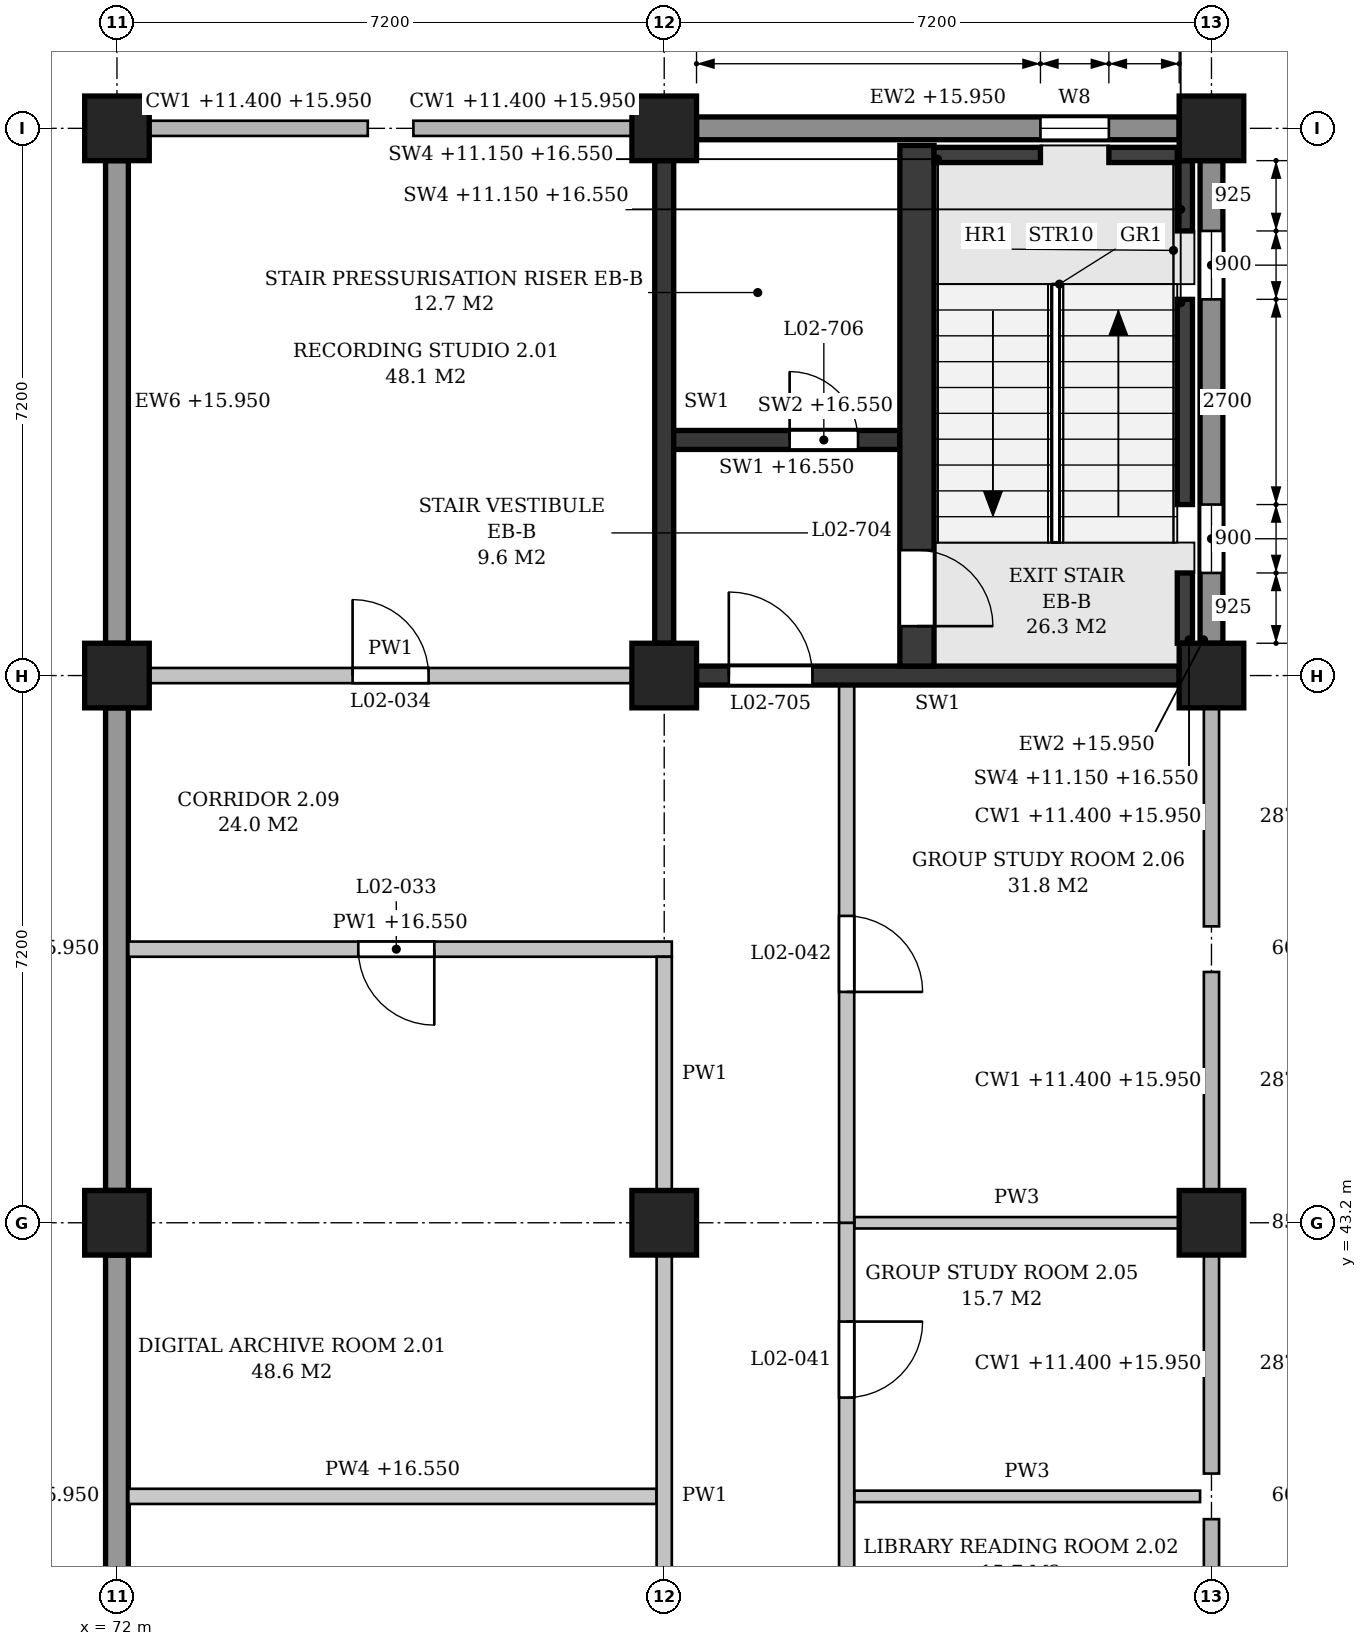
"""IFC4 building model, lengths in metres.
Left out: names, types, materials, properties, quantities, classifications, styles, units other than length and angle.
Written with IfcOpenShell. Run it as: python <this file> out.ifc"""

import sys

from ifc_helpers import new_model, si_unit, direction, frame, frame_2d, origin, origin_2d, place, context, subcontext, project, spatial, polyline, rectangle, outline, extrude, element, fill, save


model = new_model("IFC4")
c1 = context("Model", 3, precision=1e-05, world=origin(), true_north=direction((0.0, 1.0)))
c2 = subcontext(c1, "Body", "Model", "MODEL_VIEW")
j1 = project(units=[si_unit("LENGTHUNIT", "METRE"), si_unit("PLANEANGLEUNIT", "RADIAN")], contexts=[c1])
p1 = place(None, origin())
s1 = spatial("IfcSite", under=j1, at=p1, CompositionType="ELEMENT")
p2 = place(p1, origin())
s2 = spatial("IfcBuilding", under=s1, at=p2, CompositionType="ELEMENT")
p3 = place(p2, frame((0.0, 0.0, 11.4)))
s3 = spatial("IfcBuildingStorey", under=s2, at=p3, CompositionType="ELEMENT", Elevation=11.4)
for number, where, z_axis, x_axis in (
    (1, (72.0, 43.2, 0.0), (0.0, 0.0, 1.0), (1.0, 0.0, 0.0)),
    (2, (72.0, 50.4, 0.0), (0.0, 0.0, 1.0), (1.0, 0.0, 0.0)),
    (3, (72.0, 57.6, 0.0), (0.0, 0.0, 1.0), (1.0, 0.0, 0.0)),
    (4, (79.2, 43.2, 0.0), (0.0, 0.0, 1.0), (1.0, 0.0, 0.0)),
    (5, (79.2, 50.4, 0.0), (0.0, 0.0, 1.0), (1.0, 0.0, 0.0)),
    (6, (79.2, 57.6, 0.0), (0.0, 0.0, 1.0), (1.0, 0.0, 0.0)),
    (7, (86.4, 43.2, 0.0), (0.0, 0.0, 1.0), (1.0, 0.0, 0.0)),
    (8, (86.4, 50.4, 0.0), (0.0, 0.0, 1.0), (1.0, 0.0, 0.0)),
    (9, (86.4, 57.6, 0.0), (0.0, 0.0, 1.0), (1.0, 0.0, 0.0)),
):
    element("IfcColumn", number, at=place(p3, frame(where, z_axis=z_axis, x_axis=x_axis)), inside=s3, PredefinedType="COLUMN", context=c2, shape_type="SweptSolid", body=[
        extrude(rectangle(XDim=0.85, YDim=0.85, at=origin_2d()), origin(), (0.0, 0.0, 1.0), 5.4),
    ])
p4 = place(p3, frame((86.4, 50.825, 0.0), z_axis=(0.0, 0.0, 1.0), x_axis=(0.0, 1.0, 0.0)))
e10 = element("IfcWall", 10, at=p4, inside=s3, PredefinedType="STANDARD", context=c2, shape_type="SweptSolid", body=[
    extrude(rectangle(XDim=6.35, YDim=0.3, at=frame_2d((3.175, 0.0))), origin(), (0.0, 0.0, 1.0), 4.55),
])
p5 = place(p4, frame((0.925, 0.0, 0.9)))
e11 = element("IfcOpeningElement", 11, at=p5, cuts=e10, PredefinedType="OPENING", context=c2, shape_type="SweptSolid", body=[
    extrude(outline(polyline([(0.0, 0.0), (0.9, 0.0), (0.9, 2.65), (0.45, 3.1), (0.0, 2.65), (0.0, 0.0)])), frame((0.0, 0.16, 0.0), z_axis=(0.0, -1.0, 0.0), x_axis=(1.0, 0.0, 0.0)), (0.0, 0.0, 1.0), 0.32),
])
p6 = place(p4, frame((4.525, 0.0, 0.9)))
e12 = element("IfcOpeningElement", 12, at=p6, cuts=e10, PredefinedType="OPENING", context=c2, shape_type="SweptSolid", body=[
    extrude(outline(polyline([(0.0, 0.0), (0.9, 0.0), (0.9, 2.65), (0.45, 3.1), (0.0, 2.65), (0.0, 0.0)])), frame((0.0, 0.16, 0.0), z_axis=(0.0, -1.0, 0.0), x_axis=(1.0, 0.0, 0.0)), (0.0, 0.0, 1.0), 0.32),
])
p7 = place(p3, frame((85.975, 57.6, 0.0), z_axis=(0.0, 0.0, 1.0), x_axis=(-1.0, 0.0, 0.0)))
e13 = element("IfcWall", 13, at=p7, inside=s3, PredefinedType="STANDARD", context=c2, shape_type="SweptSolid", body=[
    extrude(rectangle(XDim=6.35, YDim=0.3, at=frame_2d((3.175, 0.0))), origin(), (0.0, 0.0, 1.0), 4.55),
])
p8 = place(p7, frame((0.925, 0.0, 0.9)))
e14 = element("IfcOpeningElement", 14, at=p8, cuts=e13, PredefinedType="OPENING", context=c2, shape_type="SweptSolid", body=[
    extrude(outline(polyline([(0.0, 0.0), (0.9, 0.0), (0.9, 2.65), (0.45, 3.1), (0.0, 2.65), (0.0, 0.0)])), frame((0.0, 0.16, 0.0), z_axis=(0.0, -1.0, 0.0), x_axis=(1.0, 0.0, 0.0)), (0.0, 0.0, 1.0), 0.32),
])
p9 = place(p3, frame((72.0, 36.425, 0.0), z_axis=(0.0, 0.0, 1.0), x_axis=(0.0, 1.0, 0.0)))
e15 = element("IfcWall", 15, at=p9, inside=s3, PredefinedType="STANDARD", context=c2, shape_type="SweptSolid", body=[
    extrude(rectangle(XDim=6.35, YDim=0.3, at=frame_2d((3.175, 0.0))), origin(), (0.0, 0.0, 1.0), 4.55),
])
for number, where, z_axis, x_axis in (
    (16, (72.0, 43.625, 0.0), (0.0, 0.0, 1.0), (0.0, 1.0, 0.0)),
    (17, (72.0, 50.825, 0.0), (0.0, 0.0, 1.0), (0.0, 1.0, 0.0)),
):
    element("IfcWall", number, at=place(p3, frame(where, z_axis=z_axis, x_axis=x_axis)), inside=s3, PredefinedType="STANDARD", context=c2, shape_type="SweptSolid", body=[
        extrude(rectangle(XDim=6.35, YDim=0.3, at=frame_2d((3.175, 0.0))), origin(), (0.0, 0.0, 1.0), 4.55),
    ])
p10 = place(p3, frame((79.625, 50.4, 0.0), z_axis=(0.0, 0.0, 1.0), x_axis=(1.0, 0.0, 0.0)))
e18 = element("IfcWall", 18, at=p10, inside=s3, PredefinedType="SHEAR", context=c2, shape_type="SweptSolid", body=[
    extrude(rectangle(XDim=6.35, YDim=0.25, at=frame_2d((3.175, 0.0))), origin(), (0.0, 0.0, 1.0), 4.4),
])
p11 = place(p10, frame((0.425, 0.0, 0.0)))
e19 = element("IfcOpeningElement", 19, at=p11, cuts=e18, PredefinedType="OPENING", context=c2, shape_type="SweptSolid", body=[
    extrude(rectangle(XDim=1.1, YDim=2.1, at=frame_2d((0.55, 1.05))), frame((0.0, 0.135, 0.0), z_axis=(0.0, -1.0, 0.0), x_axis=(1.0, 0.0, 0.0)), (0.0, 0.0, 1.0), 0.27),
])
p12 = place(p3, frame((79.2, 50.825, 0.0), z_axis=(0.0, 0.0, 1.0), x_axis=(0.0, 1.0, 0.0)))
e20 = element("IfcWall", 20, at=p12, inside=s3, PredefinedType="SHEAR", context=c2, shape_type="SweptSolid", body=[
    extrude(rectangle(XDim=6.35, YDim=0.25, at=frame_2d((3.175, 0.0))), origin(), (0.0, 0.0, 1.0), 4.4),
])
p13 = place(p3, frame((86.05, 50.825, -0.25), z_axis=(0.0, 0.0, 1.0), x_axis=(0.0, 1.0, 0.0)))
e21 = element("IfcWall", 21, at=p13, inside=s3, PredefinedType="SHEAR", context=c2, shape_type="SweptSolid", body=[
    extrude(rectangle(XDim=0.925, YDim=0.2, at=frame_2d((0.462, 0.0))), origin(), (0.0, 0.0, 1.0), 5.4),
])
p14 = place(p3, frame((86.05, 52.65, -0.25), z_axis=(0.0, 0.0, 1.0), x_axis=(0.0, 1.0, 0.0)))
e22 = element("IfcWall", 22, at=p14, inside=s3, PredefinedType="SHEAR", context=c2, shape_type="SweptSolid", body=[
    extrude(rectangle(XDim=2.7, YDim=0.2, at=frame_2d((1.35, 0.0))), origin(), (0.0, 0.0, 1.0), 5.4),
])
p15 = place(p3, frame((86.05, 56.25, -0.25), z_axis=(0.0, 0.0, 1.0), x_axis=(0.0, 1.0, 0.0)))
e23 = element("IfcWall", 23, at=p15, inside=s3, PredefinedType="SHEAR", context=c2, shape_type="SweptSolid", body=[
    extrude(rectangle(XDim=0.925, YDim=0.2, at=frame_2d((0.462, 0.0))), origin(), (0.0, 0.0, 1.0), 5.4),
])
p16 = place(p3, frame((82.75, 57.25, -0.25), z_axis=(0.0, 0.0, 1.0), x_axis=(1.0, 0.0, 0.0)))
e24 = element("IfcWall", 24, at=p16, inside=s3, PredefinedType="SHEAR", context=c2, shape_type="SweptSolid", body=[
    extrude(rectangle(XDim=1.4, YDim=0.2, at=frame_2d((0.7, 0.0))), origin(), (0.0, 0.0, 1.0), 5.4),
])
p17 = place(p3, frame((85.05, 57.25, -0.25), z_axis=(0.0, 0.0, 1.0), x_axis=(1.0, 0.0, 0.0)))
e25 = element("IfcWall", 25, at=p17, inside=s3, PredefinedType="SHEAR", context=c2, shape_type="SweptSolid", body=[
    extrude(rectangle(XDim=0.9, YDim=0.2, at=frame_2d((0.45, 0.0))), origin(), (0.0, 0.0, 1.0), 5.4),
])
p18 = place(p3, frame((82.525, 50.525, 0.0), z_axis=(0.0, 0.0, 1.0), x_axis=(0.0, 1.0, 0.0)))
e26 = element("IfcWall", 26, at=p18, inside=s3, PredefinedType="SHEAR", context=c2, shape_type="SweptSolid", body=[
    extrude(rectangle(XDim=6.85, YDim=0.45, at=frame_2d((3.425, 0.0))), origin(), (0.0, 0.0, 1.0), 5.15),
])
p19 = place(p18, frame((0.525, 0.0, 0.0)))
e27 = element("IfcOpeningElement", 27, at=p19, cuts=e26, PredefinedType="OPENING", context=c2, shape_type="SweptSolid", body=[
    extrude(rectangle(XDim=1.0, YDim=2.1, at=frame_2d((0.5, 1.05))), frame((0.0, 0.235, 0.0), z_axis=(0.0, -1.0, 0.0), x_axis=(1.0, 0.0, 0.0)), (0.0, 0.0, 1.0), 0.47),
])
p20 = place(p3, frame((79.325, 53.5, 0.0), z_axis=(0.0, 0.0, 1.0), x_axis=(1.0, 0.0, 0.0)))
e28 = element("IfcWall", 28, at=p20, inside=s3, PredefinedType="SHEAR", context=c2, shape_type="SweptSolid", body=[
    extrude(rectangle(XDim=2.975, YDim=0.25, at=frame_2d((1.488, 0.0))), origin(), (0.0, 0.0, 1.0), 5.15),
])
p21 = place(p20, frame((1.525, 0.0, 0.0)))
e29 = element("IfcOpeningElement", 29, at=p21, cuts=e28, PredefinedType="OPENING", context=c2, shape_type="SweptSolid", body=[
    extrude(rectangle(XDim=0.9, YDim=2.1, at=frame_2d((0.45, 1.05))), frame((0.0, 0.135, 0.0), z_axis=(0.0, -1.0, 0.0), x_axis=(1.0, 0.0, 0.0)), (0.0, 0.0, 1.0), 0.27),
])
p22 = place(p3, frame((72.15, 39.6, 0.0), z_axis=(0.0, 0.0, 1.0), x_axis=(1.0, 0.0, 0.0)))
e30 = element("IfcWall", 30, at=p22, inside=s3, PredefinedType="PARTITIONING", context=c2, shape_type="SweptSolid", body=[
    extrude(outline(polyline([(0.0, 0.0), (6.95, 0.0), (6.95, 4.4), (6.8, 4.4), (6.8, 5.15), (0.1, 5.15), (0.1, 4.55), (0.0, 4.55), (0.0, 0.0)])), frame((0.0, 0.1, 0.0), z_axis=(0.0, -1.0, 0.0), x_axis=(1.0, 0.0, 0.0)), (0.0, 0.0, 1.0), 0.2),
])
p23 = place(p3, frame((81.7, 39.6, 0.0), z_axis=(0.0, 0.0, 1.0), x_axis=(1.0, 0.0, 0.0)))
e31 = element("IfcWall", 31, at=p23, inside=s3, PredefinedType="PARTITIONING", context=c2, shape_type="SweptSolid", body=[
    extrude(rectangle(XDim=4.55, YDim=0.15, at=frame_2d((2.275, 0.0))), origin(), (0.0, 0.0, 1.0), 4.4),
])
p24 = place(p3, frame((81.7, 43.2, 0.0), z_axis=(0.0, 0.0, 1.0), x_axis=(1.0, 0.0, 0.0)))
e32 = element("IfcWall", 32, at=p24, inside=s3, PredefinedType="PARTITIONING", context=c2, shape_type="SweptSolid", body=[
    extrude(rectangle(XDim=4.275, YDim=0.15, at=frame_2d((2.138, 0.0))), origin(), (0.0, 0.0, 1.0), 4.4),
])
p25 = place(p3, frame((72.15, 46.8, 0.0), z_axis=(0.0, 0.0, 1.0), x_axis=(1.0, 0.0, 0.0)))
e33 = element("IfcWall", 33, at=p25, inside=s3, PredefinedType="PARTITIONING", context=c2, shape_type="SweptSolid", body=[
    extrude(outline(polyline([(0.0, 0.0), (7.15, 0.0), (7.15, 4.4), (6.8, 4.4), (6.8, 5.15), (0.1, 5.15), (0.1, 4.55), (0.0, 4.55), (0.0, 0.0)])), frame((0.0, 0.1, 0.0), z_axis=(0.0, -1.0, 0.0), x_axis=(1.0, 0.0, 0.0)), (0.0, 0.0, 1.0), 0.2),
])
p26 = place(p25, frame((3.025, 0.0, 0.0)))
e34 = element("IfcOpeningElement", 34, at=p26, cuts=e33, PredefinedType="OPENING", context=c2, shape_type="SweptSolid", body=[
    extrude(rectangle(XDim=1.0, YDim=2.1, at=frame_2d((0.5, 1.05))), frame((0.0, 0.11, 0.0), z_axis=(0.0, -1.0, 0.0), x_axis=(1.0, 0.0, 0.0)), (0.0, 0.0, 1.0), 0.22),
])
p27 = place(p3, frame((72.425, 50.4, 0.0), z_axis=(0.0, 0.0, 1.0), x_axis=(1.0, 0.0, 0.0)))
e35 = element("IfcWall", 35, at=p27, inside=s3, PredefinedType="PARTITIONING", context=c2, shape_type="SweptSolid", body=[
    extrude(rectangle(XDim=6.35, YDim=0.2, at=frame_2d((3.175, 0.0))), origin(), (0.0, 0.0, 1.0), 4.4),
])
p28 = place(p27, frame((2.675, 0.0, 0.0)))
e36 = element("IfcOpeningElement", 36, at=p28, cuts=e35, PredefinedType="OPENING", context=c2, shape_type="SweptSolid", body=[
    extrude(rectangle(XDim=1.0, YDim=2.1, at=frame_2d((0.5, 1.05))), frame((0.0, 0.11, 0.0), z_axis=(0.0, -1.0, 0.0), x_axis=(1.0, 0.0, 0.0)), (0.0, 0.0, 1.0), 0.22),
])
p29 = place(p3, frame((79.2, 36.425, 0.0), z_axis=(0.0, 0.0, 1.0), x_axis=(0.0, 1.0, 0.0)))
e37 = element("IfcWall", 37, at=p29, inside=s3, PredefinedType="PARTITIONING", context=c2, shape_type="SweptSolid", body=[
    extrude(rectangle(XDim=6.35, YDim=0.2, at=frame_2d((3.175, 0.0))), origin(), (0.0, 0.0, 1.0), 4.4),
])
p30 = place(p3, frame((79.2, 43.625, 0.0), z_axis=(0.0, 0.0, 1.0), x_axis=(0.0, 1.0, 0.0)))
e38 = element("IfcWall", 38, at=p30, inside=s3, PredefinedType="PARTITIONING", context=c2, shape_type="SweptSolid", body=[
    extrude(rectangle(XDim=3.075, YDim=0.2, at=frame_2d((1.538, 0.0))), origin(), (0.0, 0.0, 1.0), 4.4),
])
p31 = place(p3, frame((81.6, 36.0, 0.0), z_axis=(0.0, 0.0, 1.0), x_axis=(0.0, 1.0, 0.0)))
e39 = element("IfcWall", 39, at=p31, inside=s3, PredefinedType="PARTITIONING", context=c2, shape_type="SweptSolid", body=[
    extrude(outline(polyline([(0.0, 0.0), (7.2, 0.0), (7.2, 4.4), (6.95, 4.4), (6.95, 5.15), (0.25, 5.15), (0.25, 4.4), (0.0, 4.4), (0.0, 0.0)])), frame((0.0, 0.1, 0.0), z_axis=(0.0, -1.0, 0.0), x_axis=(1.0, 0.0, 0.0)), (0.0, 0.0, 1.0), 0.2),
])
p32 = place(p31, frame((1.3, 0.0, 0.0)))
e40 = element("IfcOpeningElement", 40, at=p32, cuts=e39, PredefinedType="OPENING", context=c2, shape_type="SweptSolid", body=[
    extrude(rectangle(XDim=1.0, YDim=2.1, at=frame_2d((0.5, 1.05))), frame((0.0, 0.11, 0.0), z_axis=(0.0, -1.0, 0.0), x_axis=(1.0, 0.0, 0.0)), (0.0, 0.0, 1.0), 0.22),
])
p33 = place(p31, frame((4.9, 0.0, 0.0)))
e41 = element("IfcOpeningElement", 41, at=p33, cuts=e39, PredefinedType="OPENING", context=c2, shape_type="SweptSolid", body=[
    extrude(rectangle(XDim=1.0, YDim=2.1, at=frame_2d((0.5, 1.05))), frame((0.0, 0.11, 0.0), z_axis=(0.0, -1.0, 0.0), x_axis=(1.0, 0.0, 0.0)), (0.0, 0.0, 1.0), 0.22),
])
p34 = place(p3, frame((81.6, 43.2, 0.0), z_axis=(0.0, 0.0, 1.0), x_axis=(0.0, 1.0, 0.0)))
e42 = element("IfcWall", 42, at=p34, inside=s3, PredefinedType="PARTITIONING", context=c2, shape_type="SweptSolid", body=[
    extrude(outline(polyline([(0.0, 0.0), (7.075, 0.0), (7.075, 4.4), (6.95, 4.4), (6.95, 5.15), (0.25, 5.15), (0.25, 4.4), (0.0, 4.4), (0.0, 0.0)])), frame((0.0, 0.1, 0.0), z_axis=(0.0, -1.0, 0.0), x_axis=(1.0, 0.0, 0.0)), (0.0, 0.0, 1.0), 0.2),
])
p35 = place(p34, frame((3.038, 0.0, 0.0)))
e43 = element("IfcOpeningElement", 43, at=p35, cuts=e42, PredefinedType="OPENING", context=c2, shape_type="SweptSolid", body=[
    extrude(rectangle(XDim=1.0, YDim=2.1, at=frame_2d((0.5, 1.05))), frame((0.0, 0.11, 0.0), z_axis=(0.0, -1.0, 0.0), x_axis=(1.0, 0.0, 0.0)), (0.0, 0.0, 1.0), 0.22),
])
p36 = place(p5, origin())
e44 = element("IfcWindow", 44, at=p36, inside=s3, PartitioningType="SINGLE_PANEL", PredefinedType="WINDOW", context=c2, shape_type="SweptSolid", body=[
    extrude(outline(polyline([(0.0, 0.0), (0.9, 0.0), (0.9, 2.65), (0.45, 3.1), (0.0, 2.65), (0.0, 0.0)])), frame((0.0, 0.03, 0.0), z_axis=(0.0, -1.0, 0.0), x_axis=(1.0, 0.0, 0.0)), (0.0, 0.0, 1.0), 0.06),
])
fill(e11, e44)
p37 = place(p6, origin())
e45 = element("IfcWindow", 45, at=p37, inside=s3, PartitioningType="SINGLE_PANEL", PredefinedType="WINDOW", context=c2, shape_type="SweptSolid", body=[
    extrude(outline(polyline([(0.0, 0.0), (0.9, 0.0), (0.9, 2.65), (0.45, 3.1), (0.0, 2.65), (0.0, 0.0)])), frame((0.0, 0.03, 0.0), z_axis=(0.0, -1.0, 0.0), x_axis=(1.0, 0.0, 0.0)), (0.0, 0.0, 1.0), 0.06),
])
fill(e12, e45)
p38 = place(p8, origin())
e46 = element("IfcWindow", 46, at=p38, inside=s3, PartitioningType="SINGLE_PANEL", PredefinedType="WINDOW", context=c2, shape_type="SweptSolid", body=[
    extrude(outline(polyline([(0.0, 0.0), (0.9, 0.0), (0.9, 2.65), (0.45, 3.1), (0.0, 2.65), (0.0, 0.0)])), frame((0.0, 0.03, 0.0), z_axis=(0.0, -1.0, 0.0), x_axis=(1.0, 0.0, 0.0)), (0.0, 0.0, 1.0), 0.06),
])
fill(e14, e46)
p39 = place(p19, frame((1.0, 0.0, 0.0), z_axis=(0.0, 0.0, 1.0), x_axis=(-1.0, 0.0, 0.0)))
e47 = element("IfcDoor", 47, at=p39, inside=s3, OperationType="SINGLE_SWING_RIGHT", PredefinedType="DOOR", context=c2, shape_type="SweptSolid", body=[
    extrude(rectangle(XDim=1.0, YDim=2.1, at=frame_2d((0.5, 1.05))), frame((0.0, 0.025, 0.0), z_axis=(0.0, -1.0, 0.0), x_axis=(1.0, 0.0, 0.0)), (0.0, 0.0, 1.0), 0.05),
])
fill(e27, e47)
p40 = place(p11, origin())
e48 = element("IfcDoor", 48, at=p40, inside=s3, OperationType="SINGLE_SWING_LEFT", PredefinedType="DOOR", context=c2, shape_type="SweptSolid", body=[
    extrude(rectangle(XDim=1.1, YDim=2.1, at=frame_2d((0.55, 1.05))), frame((0.0, 0.025, 0.0), z_axis=(0.0, -1.0, 0.0), x_axis=(1.0, 0.0, 0.0)), (0.0, 0.0, 1.0), 0.05),
])
fill(e19, e48)
p41 = place(p21, origin())
e49 = element("IfcDoor", 49, at=p41, inside=s3, OperationType="SINGLE_SWING_LEFT", PredefinedType="DOOR", context=c2, shape_type="SweptSolid", body=[
    extrude(rectangle(XDim=0.9, YDim=2.1, at=frame_2d((0.45, 1.05))), frame((0.0, 0.025, 0.0), z_axis=(0.0, -1.0, 0.0), x_axis=(1.0, 0.0, 0.0)), (0.0, 0.0, 1.0), 0.05),
])
fill(e29, e49)
p42 = place(p26, frame((1.0, 0.0, 0.0), z_axis=(0.0, 0.0, 1.0), x_axis=(-1.0, 0.0, 0.0)))
e50 = element("IfcDoor", 50, at=p42, inside=s3, OperationType="SINGLE_SWING_LEFT", PredefinedType="DOOR", context=c2, shape_type="SweptSolid", body=[
    extrude(rectangle(XDim=1.0, YDim=2.1, at=frame_2d((0.5, 1.05))), frame((0.0, 0.025, 0.0), z_axis=(0.0, -1.0, 0.0), x_axis=(1.0, 0.0, 0.0)), (0.0, 0.0, 1.0), 0.05),
])
fill(e34, e50)
p43 = place(p28, origin())
e51 = element("IfcDoor", 51, at=p43, inside=s3, OperationType="SINGLE_SWING_LEFT", PredefinedType="DOOR", context=c2, shape_type="SweptSolid", body=[
    extrude(rectangle(XDim=1.0, YDim=2.1, at=frame_2d((0.5, 1.05))), frame((0.0, 0.025, 0.0), z_axis=(0.0, -1.0, 0.0), x_axis=(1.0, 0.0, 0.0)), (0.0, 0.0, 1.0), 0.05),
])
fill(e36, e51)
p44 = place(p33, frame((1.0, 0.0, 0.0), z_axis=(0.0, 0.0, 1.0), x_axis=(-1.0, 0.0, 0.0)))
e52 = element("IfcDoor", 52, at=p44, inside=s3, OperationType="SINGLE_SWING_LEFT", PredefinedType="DOOR", context=c2, shape_type="SweptSolid", body=[
    extrude(rectangle(XDim=1.0, YDim=2.1, at=frame_2d((0.5, 1.05))), frame((0.0, 0.025, 0.0), z_axis=(0.0, -1.0, 0.0), x_axis=(1.0, 0.0, 0.0)), (0.0, 0.0, 1.0), 0.05),
])
fill(e41, e52)
p45 = place(p35, frame((1.0, 0.0, 0.0), z_axis=(0.0, 0.0, 1.0), x_axis=(-1.0, 0.0, 0.0)))
e53 = element("IfcDoor", 53, at=p45, inside=s3, OperationType="SINGLE_SWING_RIGHT", PredefinedType="DOOR", context=c2, shape_type="SweptSolid", body=[
    extrude(rectangle(XDim=1.0, YDim=2.1, at=frame_2d((0.5, 1.05))), frame((0.0, 0.025, 0.0), z_axis=(0.0, -1.0, 0.0), x_axis=(1.0, 0.0, 0.0)), (0.0, 0.0, 1.0), 0.05),
])
fill(e43, e53)
save(model, sys.argv[1])
